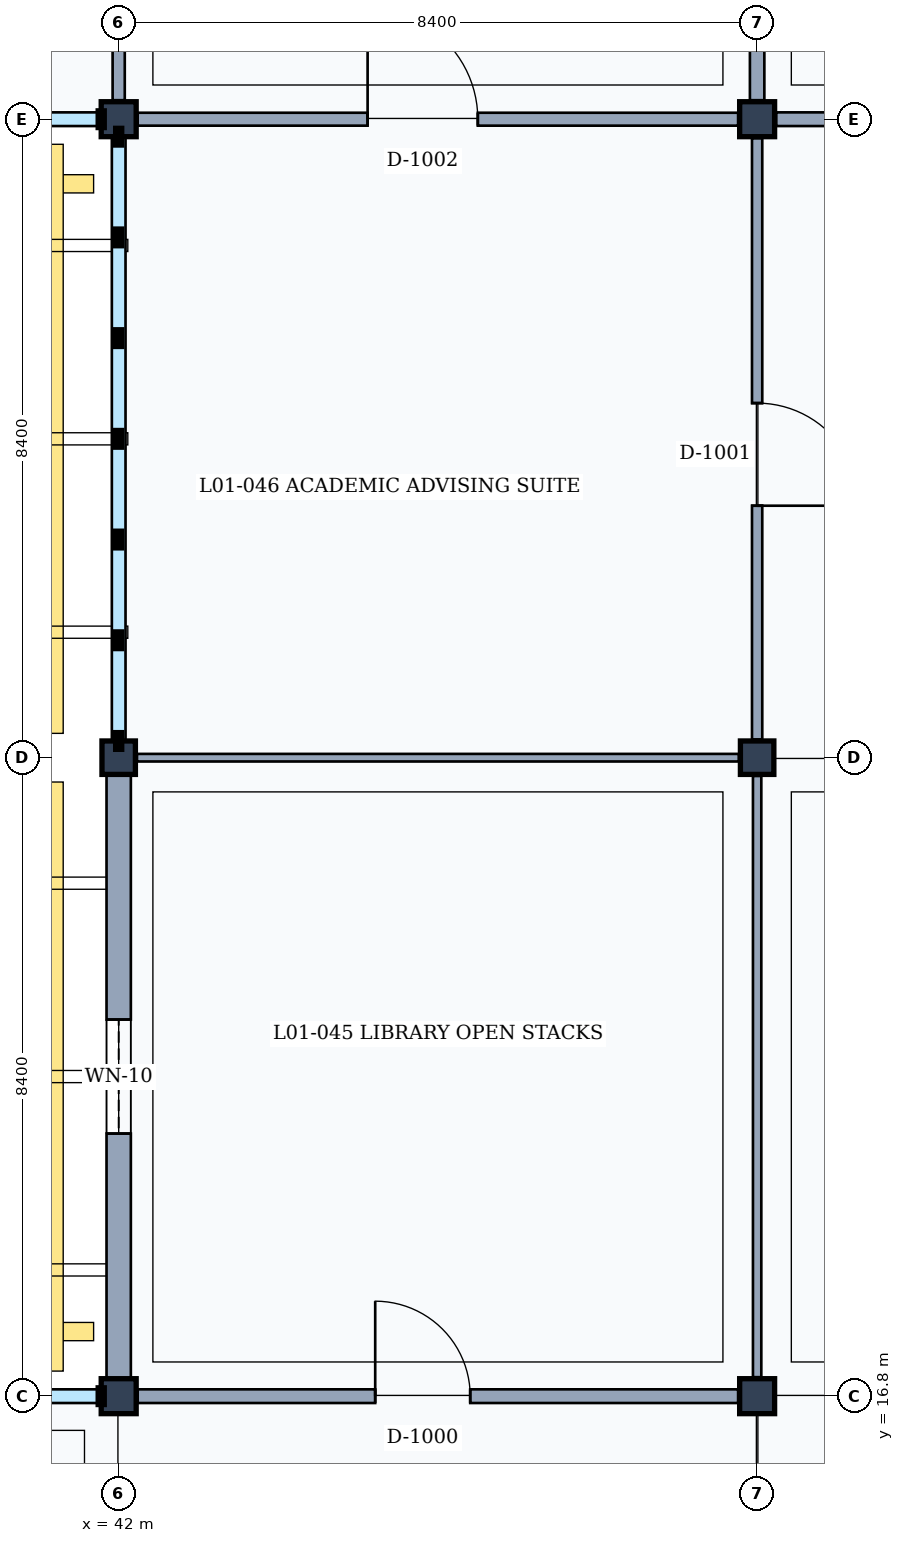
"""IFC4 building model, lengths in metres.
Left out: names, types, materials, properties, quantities, classifications, styles, units other than length and angle.
Written with IfcOpenShell. Run it as: python <this file> out.ifc"""

import sys

from ifc_helpers import new_model, si_unit, direction, frame, frame_2d, origin, origin_2d, place, context, subcontext, project, spatial, rectangle, extrude, element, fill, save


model = new_model("IFC4")
c1 = context("Model", 3, precision=1e-05, world=origin(), true_north=direction((0.0, 1.0)))
c2 = subcontext(c1, "Body", "Model", "MODEL_VIEW")
j1 = project(units=[si_unit("LENGTHUNIT", "METRE"), si_unit("PLANEANGLEUNIT", "RADIAN")], contexts=[c1])
p1 = place(None, origin())
s1 = spatial("IfcSite", under=j1, at=p1, CompositionType="ELEMENT")
p2 = place(p1, origin())
s2 = spatial("IfcBuilding", under=s1, at=p2, CompositionType="ELEMENT")
p3 = place(p2, frame((0.0, 0.0, 4.8)))
s3 = spatial("IfcBuildingStorey", under=s2, at=p3, CompositionType="ELEMENT", Elevation=4.8)
p4 = place(p3, frame((42.0, 16.8, 0.0), z_axis=(0.0, 0.0, 1.0), x_axis=(1.0, 0.0, 0.0)))
e1 = element("IfcColumn", 1, at=p4, inside=s3, PredefinedType="COLUMN", context=c2, shape_type="SweptSolid", body=[
    extrude(rectangle(XDim=0.46, YDim=0.46, at=origin_2d()), origin(), (0.0, 0.0, 1.0), 4.8),
])
p5 = place(p3, frame((42.0, 25.2, 0.0), z_axis=(0.0, 0.0, 1.0), x_axis=(1.0, 0.0, 0.0)))
e2 = element("IfcColumn", 2, at=p5, inside=s3, PredefinedType="COLUMN", context=c2, shape_type="SweptSolid", body=[
    extrude(rectangle(XDim=0.44, YDim=0.44, at=origin_2d()), origin(), (0.0, 0.0, 1.0), 4.8),
])
for number, where, z_axis, x_axis in (
    (3, (42.0, 33.6, 0.0), (0.0, 0.0, 1.0), (1.0, 0.0, 0.0)),
    (4, (50.4, 16.8, 0.0), (0.0, 0.0, 1.0), (1.0, 0.0, 0.0)),
):
    element("IfcColumn", number, at=place(p3, frame(where, z_axis=z_axis, x_axis=x_axis)), inside=s3, PredefinedType="COLUMN", context=c2, shape_type="SweptSolid", body=[
        extrude(rectangle(XDim=0.46, YDim=0.46, at=origin_2d()), origin(), (0.0, 0.0, 1.0), 4.8),
    ])
p6 = place(p3, frame((50.4, 25.2, 0.0), z_axis=(0.0, 0.0, 1.0), x_axis=(1.0, 0.0, 0.0)))
e5 = element("IfcColumn", 5, at=p6, inside=s3, PredefinedType="COLUMN", context=c2, shape_type="SweptSolid", body=[
    extrude(rectangle(XDim=0.44, YDim=0.44, at=origin_2d()), origin(), (0.0, 0.0, 1.0), 4.8),
])
p7 = place(p3, frame((50.4, 33.6, 0.0), z_axis=(0.0, 0.0, 1.0), x_axis=(1.0, 0.0, 0.0)))
e6 = element("IfcColumn", 6, at=p7, inside=s3, PredefinedType="COLUMN", context=c2, shape_type="SweptSolid", body=[
    extrude(rectangle(XDim=0.46, YDim=0.46, at=origin_2d()), origin(), (0.0, 0.0, 1.0), 4.8),
])
p8 = place(p3, frame((42.0, 17.03, 0.0), z_axis=(0.0, 0.0, 1.0), x_axis=(0.0, 1.0, 0.0)))
e7 = element("IfcWall", 7, at=p8, inside=s3, PredefinedType="SOLIDWALL", context=c2, shape_type="SweptSolid", body=[
    extrude(rectangle(XDim=7.95, YDim=0.32, at=frame_2d((3.975, 0.0))), origin(), (0.0, 0.0, 1.0), 3.96),
])
p9 = place(p8, frame((3.225, 0.0, 0.9)))
e8 = element("IfcOpeningElement", 8, at=p9, cuts=e7, PredefinedType="OPENING", context=c2, shape_type="SweptSolid", body=[
    extrude(rectangle(XDim=1.5, YDim=1.85, at=frame_2d((0.75, 0.925))), frame((0.0, 0.17, 0.0), z_axis=(0.0, -1.0, 0.0), x_axis=(1.0, 0.0, 0.0)), (0.0, 0.0, 1.0), 0.34),
])
p10 = place(p3, frame((42.0, 33.85, 0.0), z_axis=(0.0, 0.0, 1.0), x_axis=(0.0, 1.0, 0.0)))
e9 = element("IfcWall", 9, at=p10, inside=s3, PredefinedType="PARTITIONING", context=c2, shape_type="SweptSolid", body=[
    extrude(rectangle(XDim=7.92, YDim=0.16, at=frame_2d((3.96, 0.0))), origin(), (0.0, 0.0, 1.0), 3.92),
])
p11 = place(p3, frame((42.25, 16.8, 0.0), z_axis=(0.0, 0.0, 1.0), x_axis=(1.0, 0.0, 0.0)))
e10 = element("IfcWall", 10, at=p11, inside=s3, PredefinedType="PARTITIONING", context=c2, shape_type="SweptSolid", body=[
    extrude(rectangle(XDim=7.9, YDim=0.18, at=frame_2d((3.95, 0.0))), origin(), (0.0, 0.0, 1.0), 3.92),
])
p12 = place(p11, frame((3.125, 0.0, 0.0)))
e11 = element("IfcOpeningElement", 11, at=p12, cuts=e10, PredefinedType="OPENING", context=c2, shape_type="SweptSolid", body=[
    extrude(rectangle(XDim=1.25, YDim=2.3, at=frame_2d((0.625, 1.15))), frame((0.0, 0.1, 0.0), z_axis=(0.0, -1.0, 0.0), x_axis=(1.0, 0.0, 0.0)), (0.0, 0.0, 1.0), 0.2),
])
p13 = place(p3, frame((50.4, 17.05, 0.0), z_axis=(0.0, 0.0, 1.0), x_axis=(0.0, 1.0, 0.0)))
e12 = element("IfcWall", 12, at=p13, inside=s3, PredefinedType="PARTITIONING", context=c2, shape_type="SweptSolid", body=[
    extrude(rectangle(XDim=7.91, YDim=0.11, at=frame_2d((3.955, 0.0))), origin(), (0.0, 0.0, 1.0), 3.92),
])
p14 = place(p3, frame((42.24, 25.2, 0.0), z_axis=(0.0, 0.0, 1.0), x_axis=(1.0, 0.0, 0.0)))
e13 = element("IfcWall", 13, at=p14, inside=s3, PredefinedType="MOVABLE", context=c2, shape_type="SweptSolid", body=[
    extrude(rectangle(XDim=7.92, YDim=0.1, at=frame_2d((3.96, 0.0))), origin(), (0.0, 0.0, 1.0), 3.92),
])
p15 = place(p3, frame((50.4, 25.44, 0.0), z_axis=(0.0, 0.0, 1.0), x_axis=(0.0, 1.0, 0.0)))
e14 = element("IfcWall", 14, at=p15, inside=s3, PredefinedType="PARTITIONING", context=c2, shape_type="SweptSolid", body=[
    extrude(rectangle(XDim=7.91, YDim=0.135, at=frame_2d((3.955, 0.0))), origin(), (0.0, 0.0, 1.0), 3.92),
])
p16 = place(p15, frame((3.075, 0.0, 0.0)))
e15 = element("IfcOpeningElement", 15, at=p16, cuts=e14, PredefinedType="OPENING", context=c2, shape_type="SweptSolid", body=[
    extrude(rectangle(XDim=1.35, YDim=2.25, at=frame_2d((0.675, 1.125))), frame((0.0, 0.077, 0.0), z_axis=(0.0, -1.0, 0.0), x_axis=(1.0, 0.0, 0.0)), (0.0, 0.0, 1.0), 0.155),
])
p17 = place(p3, frame((42.25, 33.6, 0.0), z_axis=(0.0, 0.0, 1.0), x_axis=(1.0, 0.0, 0.0)))
e16 = element("IfcWall", 16, at=p17, inside=s3, PredefinedType="PARTITIONING", context=c2, shape_type="SweptSolid", body=[
    extrude(rectangle(XDim=7.9, YDim=0.17, at=frame_2d((3.95, 0.0))), origin(), (0.0, 0.0, 1.0), 3.92),
])
p18 = place(p17, frame((3.025, 0.0, 0.0)))
e17 = element("IfcOpeningElement", 17, at=p18, cuts=e16, PredefinedType="OPENING", context=c2, shape_type="SweptSolid", body=[
    extrude(rectangle(XDim=1.45, YDim=2.35, at=frame_2d((0.725, 1.175))), frame((0.0, 0.095, 0.0), z_axis=(0.0, -1.0, 0.0), x_axis=(1.0, 0.0, 0.0)), (0.0, 0.0, 1.0), 0.19),
])
p19 = place(p3, frame((50.4, 33.85, 0.0), z_axis=(0.0, 0.0, 1.0), x_axis=(0.0, 1.0, 0.0)))
e18 = element("IfcWall", 18, at=p19, inside=s3, PredefinedType="PARTITIONING", context=c2, shape_type="SweptSolid", body=[
    extrude(rectangle(XDim=7.92, YDim=0.19, at=frame_2d((3.96, 0.0))), origin(), (0.0, 0.0, 1.0), 3.92),
])
p20 = place(p3, frame((50.65, 33.6, 0.0), z_axis=(0.0, 0.0, 1.0), x_axis=(1.0, 0.0, 0.0)))
e19 = element("IfcWall", 19, at=p20, inside=s3, PredefinedType="PARTITIONING", context=c2, shape_type="SweptSolid", body=[
    extrude(rectangle(XDim=7.92, YDim=0.18, at=frame_2d((3.96, 0.0))), origin(), (0.0, 0.0, 1.0), 3.92),
])
p21 = place(p20, frame((2.925, 0.0, 0.0)))
e20 = element("IfcOpeningElement", 20, at=p21, cuts=e19, PredefinedType="OPENING", context=c2, shape_type="SweptSolid", body=[
    extrude(rectangle(XDim=1.65, YDim=2.25, at=frame_2d((0.825, 1.125))), frame((0.0, 0.1, 0.0), z_axis=(0.0, -1.0, 0.0), x_axis=(1.0, 0.0, 0.0)), (0.0, 0.0, 1.0), 0.2),
])
p22 = place(p9, origin())
e21 = element("IfcWindow", 21, at=p22, inside=s3, PartitioningType="SINGLE_PANEL", PredefinedType="WINDOW", context=c2, shape_type="SweptSolid", body=[
    extrude(rectangle(XDim=1.5, YDim=1.85, at=frame_2d((0.75, 0.925))), frame((0.0, 0.03, 0.0), z_axis=(0.0, -1.0, 0.0), x_axis=(1.0, 0.0, 0.0)), (0.0, 0.0, 1.0), 0.06),
])
fill(e8, e21)
p23 = place(p12, origin())
e22 = element("IfcDoor", 22, at=p23, inside=s3, OperationType="SINGLE_SWING_LEFT", PredefinedType="DOOR", context=c2, shape_type="SweptSolid", body=[
    extrude(rectangle(XDim=1.25, YDim=2.3, at=frame_2d((0.625, 1.15))), frame((0.0, 0.025, 0.0), z_axis=(0.0, -1.0, 0.0), x_axis=(1.0, 0.0, 0.0)), (0.0, 0.0, 1.0), 0.05),
])
fill(e11, e22)
p24 = place(p16, frame((1.35, 0.0, 0.0), z_axis=(0.0, 0.0, 1.0), x_axis=(-1.0, 0.0, 0.0)))
e23 = element("IfcDoor", 23, at=p24, inside=s3, OperationType="SINGLE_SWING_RIGHT", PredefinedType="DOOR", context=c2, shape_type="SweptSolid", body=[
    extrude(rectangle(XDim=1.35, YDim=2.25, at=frame_2d((0.675, 1.125))), frame((0.0, 0.025, 0.0), z_axis=(0.0, -1.0, 0.0), x_axis=(1.0, 0.0, 0.0)), (0.0, 0.0, 1.0), 0.05),
])
fill(e15, e23)
p25 = place(p18, origin())
e24 = element("IfcDoor", 24, at=p25, inside=s3, OperationType="SINGLE_SWING_LEFT", PredefinedType="DOOR", context=c2, shape_type="SweptSolid", body=[
    extrude(rectangle(XDim=1.45, YDim=2.35, at=frame_2d((0.725, 1.175))), frame((0.0, 0.025, 0.0), z_axis=(0.0, -1.0, 0.0), x_axis=(1.0, 0.0, 0.0)), (0.0, 0.0, 1.0), 0.05),
])
fill(e17, e24)
save(model, sys.argv[1])
